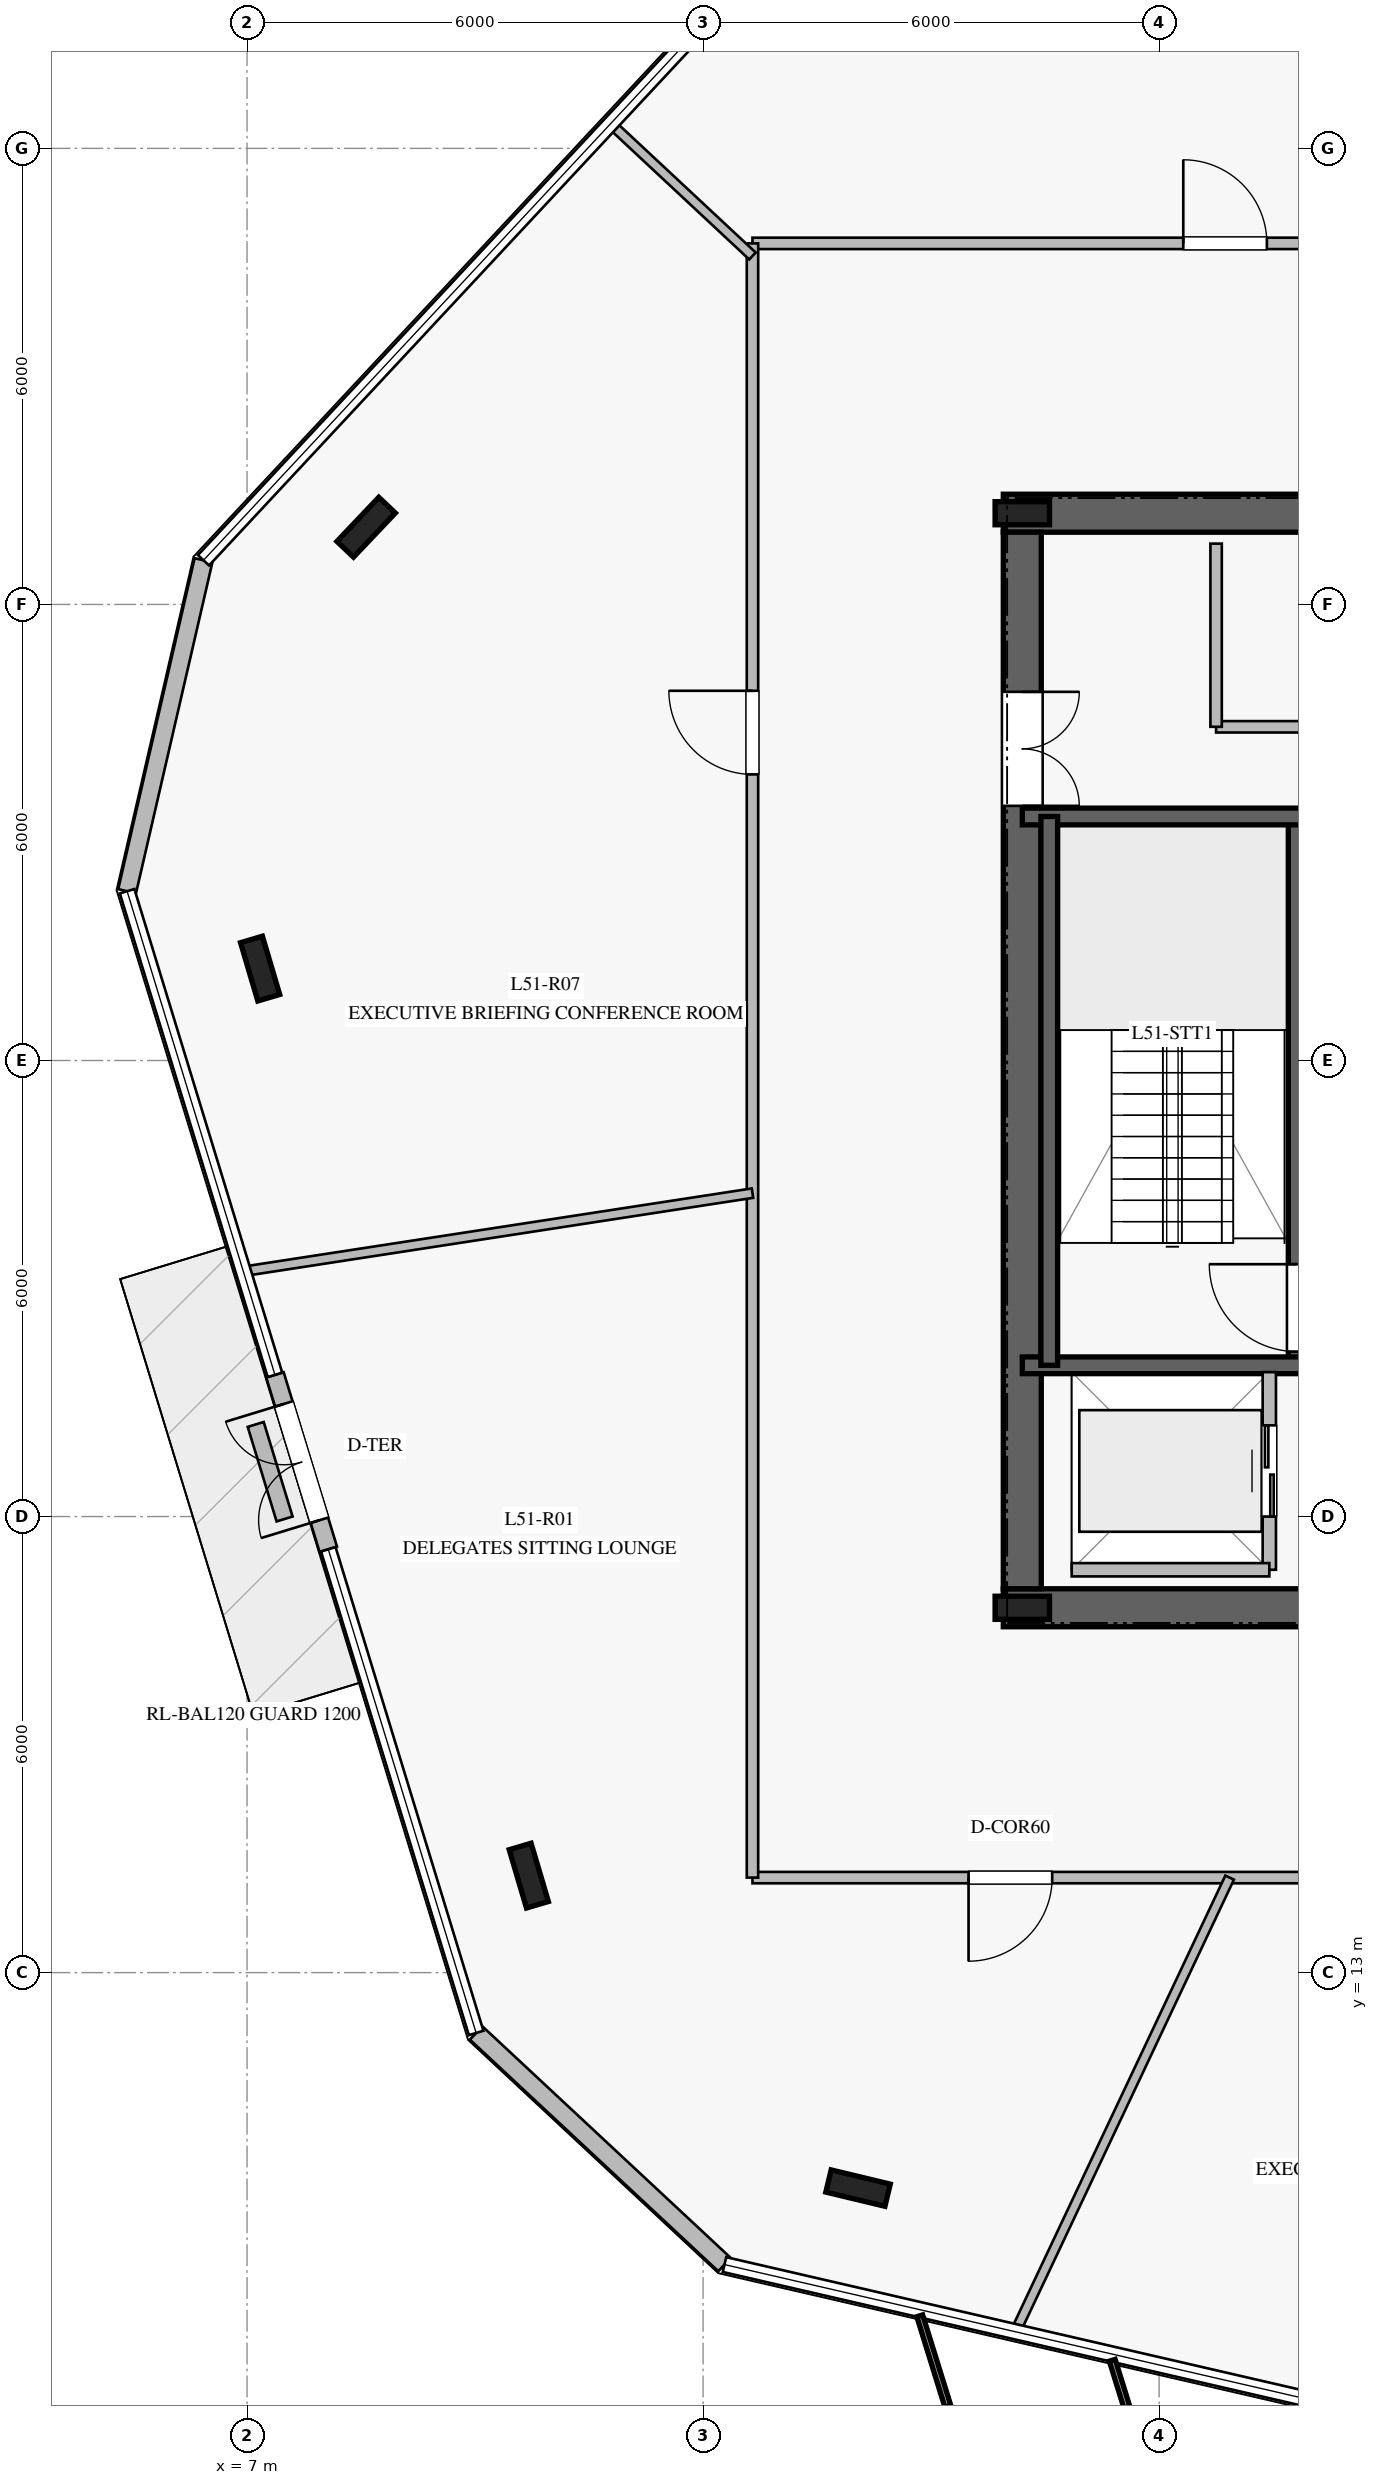
"""IFC4 building model, lengths in metres.
Left out: names, types, materials, properties, quantities, classifications, styles, units other than length and angle.
Written with IfcOpenShell. Run it as: python <this file> out.ifc"""

import sys

from ifc_helpers import new_model, si_unit, direction, frame, frame_2d, origin, origin_2d, place, context, subcontext, project, spatial, rectangle, i_section, extrude, element, fill, save


model = new_model("IFC4")
c1 = context("Model", 3, precision=1e-05, world=origin(), true_north=direction((0.0, 1.0)))
c2 = subcontext(c1, "Body", "Model", "MODEL_VIEW")
j1 = project(units=[si_unit("LENGTHUNIT", "METRE"), si_unit("PLANEANGLEUNIT", "RADIAN")], contexts=[c1])
p1 = place(None, origin())
s1 = spatial("IfcSite", under=j1, at=p1, CompositionType="ELEMENT")
p2 = place(p1, origin())
s2 = spatial("IfcBuilding", under=s1, at=p2, CompositionType="ELEMENT")
p3 = place(p2, frame((0.0, 0.0, 212.8)))
s3 = spatial("IfcBuildingStorey", under=s2, at=p3, CompositionType="ELEMENT", Elevation=212.8)
p4 = place(p3, frame((16.95, 17.8, 0.0), z_axis=(0.0, 0.0, 1.0), x_axis=(1.0, 0.0, 0.0)))
e1 = element("IfcWall", 1, at=p4, inside=s3, PredefinedType="SHEAR", context=c2, shape_type="SweptSolid", body=[
    extrude(rectangle(XDim=16.1, YDim=0.5, at=frame_2d((8.05, 0.0))), origin(), (0.0, 0.0, 1.0), 3.78),
])
p5 = place(p4, frame((5.0, 0.0, 0.0)))
e2 = element("IfcOpeningElement", 2, at=p5, cuts=e1, PredefinedType="OPENING", context=c2, shape_type="SweptSolid", body=[
    extrude(rectangle(XDim=1.2, YDim=2.25, at=frame_2d((0.6, 1.125))), frame((0.0, 0.26, 0.0), z_axis=(0.0, -1.0, 0.0), x_axis=(1.0, 0.0, 0.0)), (0.0, 0.0, 1.0), 0.52),
])
p6 = place(p4, frame((13.95, 0.0, 0.0)))
e3 = element("IfcOpeningElement", 3, at=p6, cuts=e1, PredefinedType="OPENING", context=c2, shape_type="SweptSolid", body=[
    extrude(rectangle(XDim=0.9, YDim=2.1, at=frame_2d((0.45, 1.05))), frame((0.0, 0.26, 0.0), z_axis=(0.0, -1.0, 0.0), x_axis=(1.0, 0.0, 0.0)), (0.0, 0.0, 1.0), 0.52),
])
p7 = place(p4, frame((9.2, 0.0, 0.0)))
e4 = element("IfcOpeningElement", 4, at=p7, cuts=e1, PredefinedType="OPENING", context=c2, shape_type="SweptSolid", body=[
    extrude(rectangle(XDim=1.1, YDim=2.2, at=frame_2d((0.55, 1.1))), frame((0.0, 0.26, 0.0), z_axis=(0.0, -1.0, 0.0), x_axis=(1.0, 0.0, 0.0)), (0.0, 0.0, 1.0), 0.52),
])
p8 = place(p3, frame((33.05, 32.2, 0.0), z_axis=(0.0, 0.0, 1.0), x_axis=(-1.0, 0.0, 0.0)))
e5 = element("IfcWall", 5, at=p8, inside=s3, PredefinedType="SHEAR", context=c2, shape_type="SweptSolid", body=[
    extrude(rectangle(XDim=16.1, YDim=0.5, at=frame_2d((8.05, 0.0))), origin(), (0.0, 0.0, 1.0), 3.78),
])
p9 = place(p8, frame((5.0, 0.0, 0.0)))
e6 = element("IfcOpeningElement", 6, at=p9, cuts=e5, PredefinedType="OPENING", context=c2, shape_type="SweptSolid", body=[
    extrude(rectangle(XDim=1.2, YDim=2.25, at=frame_2d((0.6, 1.125))), frame((0.0, 0.26, 0.0), z_axis=(0.0, -1.0, 0.0), x_axis=(1.0, 0.0, 0.0)), (0.0, 0.0, 1.0), 0.52),
])
p10 = place(p8, frame((9.825, 0.0, 0.0)))
e7 = element("IfcOpeningElement", 7, at=p10, cuts=e5, PredefinedType="OPENING", context=c2, shape_type="SweptSolid", body=[
    extrude(rectangle(XDim=1.1, YDim=2.2, at=frame_2d((0.55, 1.1))), frame((0.0, 0.26, 0.0), z_axis=(0.0, -1.0, 0.0), x_axis=(1.0, 0.0, 0.0)), (0.0, 0.0, 1.0), 0.52),
])
p11 = place(p3, frame((17.2, 31.95, 0.0), z_axis=(0.0, 0.0, 1.0), x_axis=(0.0, -1.0, 0.0)))
e8 = element("IfcWall", 8, at=p11, inside=s3, PredefinedType="SHEAR", context=c2, shape_type="SweptSolid", body=[
    extrude(rectangle(XDim=13.9, YDim=0.5, at=frame_2d((6.95, 0.0))), origin(), (0.0, 0.0, 1.0), 3.78),
])
p12 = place(p11, frame((2.1, 0.0, 0.0)))
e9 = element("IfcOpeningElement", 9, at=p12, cuts=e8, PredefinedType="OPENING", context=c2, shape_type="SweptSolid", body=[
    extrude(rectangle(XDim=1.5, YDim=2.2, at=frame_2d((0.75, 1.1))), frame((0.0, 0.26, 0.0), z_axis=(0.0, -1.0, 0.0), x_axis=(1.0, 0.0, 0.0)), (0.0, 0.0, 1.0), 0.52),
])
for number, where, z_axis, x_axis in (
    (10, (17.2, 17.8, 0.0), (0.0, 0.0, 1.0), (1.0, 0.0, 0.0)),
    (11, (17.2, 32.2, 0.0), (0.0, 0.0, 1.0), (1.0, 0.0, 0.0)),
):
    element("IfcColumn", number, at=place(p3, frame(where, z_axis=z_axis, x_axis=x_axis)), inside=s3, PredefinedType="COLUMN", context=c2, shape_type="SweptSolid", body=[
        extrude(i_section(OverallWidth=0.304, OverallDepth=0.716, WebThickness=0.021, FlangeThickness=0.04, at=origin_2d()), origin(), (0.0, 0.0, 1.0), 4.0),
    ])
p13 = place(p3, frame((20.81, 20.99, 0.0), z_axis=(0.0, 0.0, 1.0), x_axis=(0.0, 1.0, 0.0)))
e12 = element("IfcWall", 12, at=p13, inside=s3, PredefinedType="SOLIDWALL", context=c2, shape_type="SweptSolid", body=[
    extrude(rectangle(XDim=7.22, YDim=0.22, at=frame_2d((3.61, 0.0))), origin(), (0.0, 0.0, 1.0), 3.78),
])
p14 = place(p13, frame((0.18, 0.0, 0.0)))
e13 = element("IfcOpeningElement", 13, at=p14, cuts=e12, PredefinedType="OPENING", context=c2, shape_type="SweptSolid", body=[
    extrude(rectangle(XDim=1.15, YDim=2.2, at=frame_2d((0.575, 1.1))), frame((0.0, 0.12, 0.0), z_axis=(0.0, -1.0, 0.0), x_axis=(1.0, 0.0, 0.0)), (0.0, 0.0, 1.0), 0.24),
])
for number, where, z_axis, x_axis in (
    (14, (17.2, 20.99, 0.0), (0.0, 0.0, 1.0), (1.0, 0.0, 0.0)),
    (15, (17.2, 28.21, 0.0), (0.0, 0.0, 1.0), (1.0, 0.0, 0.0)),
):
    element("IfcWall", number, at=place(p3, frame(where, z_axis=z_axis, x_axis=x_axis)), inside=s3, PredefinedType="SOLIDWALL", context=c2, shape_type="SweptSolid", body=[
        extrude(rectangle(XDim=3.72, YDim=0.22, at=frame_2d((1.86, 0.0))), origin(), (0.0, 0.0, 1.0), 3.78),
    ])
p15 = place(p3, frame((17.555, 28.21, 0.0), z_axis=(0.0, 0.0, 1.0), x_axis=(0.0, -1.0, 0.0)))
e16 = element("IfcWall", 16, at=p15, inside=s3, PredefinedType="SOLIDWALL", context=c2, shape_type="SweptSolid", body=[
    extrude(rectangle(XDim=7.22, YDim=0.22, at=frame_2d((3.61, 0.0))), origin(), (0.0, 0.0, 1.0), 3.78),
])
for number, where, z_axis, x_axis in (
    (17, (8.567, 32.016, 0.0), (0.0, 0.0, 1.0), (0.688, 0.725, 0.0)),
    (18, (7.172, 26.209, 0.0), (0.0, 0.0, 1.0), (-0.284, 0.959, 0.0)),
    (19, (10.707, 14.276, 0.0), (0.0, 0.0, 1.0), (-0.284, 0.959, 0.0)),
    (20, (15.039, 10.165, 0.0), (0.0, 0.0, 1.0), (-0.972, 0.233, 0.0)),
):
    element("IfcColumn", number, at=place(p3, frame(where, z_axis=z_axis, x_axis=x_axis)), inside=s3, PredefinedType="COLUMN", context=c2, shape_type="SweptSolid", body=[
        extrude(i_section(OverallWidth=0.3, OverallDepth=0.8, WebThickness=0.018, FlangeThickness=0.033, at=origin_2d()), origin(), (0.0, 0.0, 1.0), 4.0),
    ])
p16 = place(p3, frame((6.427, 31.581, 0.0), z_axis=(0.0, 0.0, 1.0), x_axis=(-0.224883448427, -0.974385670371, 0.0)))
e21 = element("IfcWall", 21, at=p16, inside=s3, PredefinedType="STANDARD", context=c2, shape_type="SweptSolid", body=[
    extrude(rectangle(XDim=4.469, YDim=0.24, at=frame_2d((2.234, 0.0))), origin(), (0.0, 0.0, 1.0), 3.78),
])
p17 = place(p3, frame((7.367, 20.864, 0.0), z_axis=(0.0, 0.0, 1.0), x_axis=(0.292570005461, -0.95624410686, 0.0)))
e22 = element("IfcWall", 22, at=p17, inside=s3, PredefinedType="STANDARD", context=c2, shape_type="SweptSolid", body=[
    extrude(rectangle(XDim=2.4, YDim=0.24, at=frame_2d((1.2, 0.0))), origin(), (0.0, 0.0, 1.0), 3.78),
])
p18 = place(p17, frame((0.4, 0.0, 0.0)))
e23 = element("IfcOpeningElement", 23, at=p18, cuts=e22, PredefinedType="OPENING", context=c2, shape_type="SweptSolid", body=[
    extrude(rectangle(XDim=1.6, YDim=2.25, at=frame_2d((0.8, 1.125))), frame((0.0, 0.13, 0.0), z_axis=(0.0, -1.0, 0.0), x_axis=(1.0, 0.0, 0.0)), (0.0, 0.0, 1.0), 0.26),
])
p19 = place(p3, frame((10.014, 12.206, 0.0), z_axis=(0.0, 0.0, 1.0), x_axis=(0.73139858415, -0.681950226265, 0.0)))
e24 = element("IfcWall", 24, at=p19, inside=s3, PredefinedType="STANDARD", context=c2, shape_type="SweptSolid", body=[
    extrude(rectangle(XDim=4.468, YDim=0.24, at=frame_2d((2.234, 0.0))), origin(), (0.0, 0.0, 1.0), 3.78),
])
p20 = place(p3, frame((7.114, 20.212, 0.0), z_axis=(0.0, 0.0, 1.0), x_axis=(0.292080232212, -0.956393819486, 0.0)))
e25 = element("IfcWall", 25, at=p20, inside=s3, PredefinedType="USERDEFINED", context=c2, shape_type="SweptSolid", body=[
    extrude(rectangle(XDim=1.301, YDim=0.22, at=frame_2d((0.65, 0.0))), origin(), (0.0, 0.0, 1.0), 0.4),
])
p21 = place(p3, frame((19.75, 29.39, 0.0), z_axis=(0.0, 0.0, 1.0), x_axis=(1.0, 0.0, 0.0)))
e26 = element("IfcWall", 26, at=p21, inside=s3, PredefinedType="PARTITIONING", context=c2, shape_type="SweptSolid", body=[
    extrude(rectangle(XDim=5.9, YDim=0.15, at=frame_2d((2.95, 0.0))), origin(), (0.0, 0.0, 1.0), 3.78),
])
p22 = place(p3, frame((19.75, 29.39, 0.0), z_axis=(0.0, 0.0, 1.0), x_axis=(0.0, 1.0, 0.0)))
e27 = element("IfcWall", 27, at=p22, inside=s3, PredefinedType="PARTITIONING", context=c2, shape_type="SweptSolid", body=[
    extrude(rectangle(XDim=2.41, YDim=0.15, at=frame_2d((1.205, 0.0))), origin(), (0.0, 0.0, 1.0), 3.78),
])
p23 = place(p3, frame((20.45, 18.3, 0.0), z_axis=(0.0, 0.0, 1.0), x_axis=(0.0, 1.0, 0.0)))
e28 = element("IfcWall", 28, at=p23, inside=s3, PredefinedType="PARTITIONING", context=c2, shape_type="SweptSolid", body=[
    extrude(rectangle(XDim=2.6, YDim=0.175, at=frame_2d((1.3, 0.0))), origin(), (0.0, 0.0, 1.0), 3.78),
])
p24 = place(p23, frame((0.7, 0.0, 0.0)))
e29 = element("IfcOpeningElement", 29, at=p24, cuts=e28, PredefinedType="OPENING", context=c2, shape_type="SweptSolid", body=[
    extrude(rectangle(XDim=1.2, YDim=2.2, at=frame_2d((0.6, 1.1))), frame((0.0, 0.098, 0.0), z_axis=(0.0, -1.0, 0.0), x_axis=(1.0, 0.0, 0.0)), (0.0, 0.0, 1.0), 0.195),
])
p25 = place(p3, frame((17.85, 18.3, 0.0), z_axis=(0.0, 0.0, 1.0), x_axis=(1.0, 0.0, 0.0)))
e30 = element("IfcWall", 30, at=p25, inside=s3, PredefinedType="PARTITIONING", context=c2, shape_type="SweptSolid", body=[
    extrude(rectangle(XDim=2.6, YDim=0.175, at=frame_2d((1.3, 0.0))), origin(), (0.0, 0.0, 1.0), 3.78),
])
p26 = place(p3, frame((13.65, 35.75, 0.0), z_axis=(0.0, 0.0, 1.0), x_axis=(1.0, 0.0, 0.0)))
e31 = element("IfcWall", 31, at=p26, inside=s3, PredefinedType="PARTITIONING", context=c2, shape_type="SweptSolid", body=[
    extrude(rectangle(XDim=22.7, YDim=0.15, at=frame_2d((11.35, 0.0))), origin(), (0.0, 0.0, 1.0), 3.28),
])
p27 = place(p26, frame((16.829, 0.0, 0.0)))
e32 = element("IfcOpeningElement", 32, at=p27, cuts=e31, PredefinedType="OPENING", context=c2, shape_type="SweptSolid", body=[
    extrude(rectangle(XDim=1.1, YDim=2.2, at=frame_2d((0.55, 1.1))), frame((0.0, 0.085, 0.0), z_axis=(0.0, -1.0, 0.0), x_axis=(1.0, 0.0, 0.0)), (0.0, 0.0, 1.0), 0.17),
])
p28 = place(p26, frame((5.668, 0.0, 0.0)))
e33 = element("IfcOpeningElement", 33, at=p28, cuts=e31, PredefinedType="OPENING", context=c2, shape_type="SweptSolid", body=[
    extrude(rectangle(XDim=1.1, YDim=2.2, at=frame_2d((0.55, 1.1))), frame((0.0, 0.085, 0.0), z_axis=(0.0, -1.0, 0.0), x_axis=(1.0, 0.0, 0.0)), (0.0, 0.0, 1.0), 0.17),
])
p29 = place(p3, frame((36.35, 14.25, 0.0), z_axis=(0.0, 0.0, 1.0), x_axis=(-1.0, 0.0, 0.0)))
e34 = element("IfcWall", 34, at=p29, inside=s3, PredefinedType="PARTITIONING", context=c2, shape_type="SweptSolid", body=[
    extrude(rectangle(XDim=22.7, YDim=0.15, at=frame_2d((11.35, 0.0))), origin(), (0.0, 0.0, 1.0), 3.02),
])
p30 = place(p29, frame((18.757, 0.0, 0.0)))
e35 = element("IfcOpeningElement", 35, at=p30, cuts=e34, PredefinedType="OPENING", context=c2, shape_type="SweptSolid", body=[
    extrude(rectangle(XDim=1.1, YDim=2.2, at=frame_2d((0.55, 1.1))), frame((0.0, 0.085, 0.0), z_axis=(0.0, -1.0, 0.0), x_axis=(1.0, 0.0, 0.0)), (0.0, 0.0, 1.0), 0.17),
])
p31 = place(p29, frame((10.91, 0.0, 0.0)))
e36 = element("IfcOpeningElement", 36, at=p31, cuts=e34, PredefinedType="OPENING", context=c2, shape_type="SweptSolid", body=[
    extrude(rectangle(XDim=1.1, YDim=2.2, at=frame_2d((0.55, 1.1))), frame((0.0, 0.085, 0.0), z_axis=(0.0, -1.0, 0.0), x_axis=(1.0, 0.0, 0.0)), (0.0, 0.0, 1.0), 0.17),
])
p32 = place(p3, frame((13.65, 14.25, 0.0), z_axis=(0.0, 0.0, 1.0), x_axis=(0.0, 1.0, 0.0)))
e37 = element("IfcWall", 37, at=p32, inside=s3, PredefinedType="PARTITIONING", context=c2, shape_type="SweptSolid", body=[
    extrude(rectangle(XDim=21.5, YDim=0.15, at=frame_2d((10.75, 0.0))), origin(), (0.0, 0.0, 1.0), 3.05),
])
p33 = place(p32, frame((14.514, 0.0, 0.0)))
e38 = element("IfcOpeningElement", 38, at=p33, cuts=e37, PredefinedType="OPENING", context=c2, shape_type="SweptSolid", body=[
    extrude(rectangle(XDim=1.1, YDim=2.2, at=frame_2d((0.55, 1.1))), frame((0.0, 0.085, 0.0), z_axis=(0.0, -1.0, 0.0), x_axis=(1.0, 0.0, 0.0)), (0.0, 0.0, 1.0), 0.17),
])
p34 = place(p3, frame((13.65, 35.584, 0.0), z_axis=(0.0, 0.0, 1.0), x_axis=(-0.731138505923, 0.682229056225, 0.0)))
e39 = element("IfcWall", 39, at=p34, inside=s3, PredefinedType="PARTITIONING", context=c2, shape_type="SweptSolid", body=[
    extrude(rectangle(XDim=2.536, YDim=0.125, at=frame_2d((1.268, 0.0))), origin(), (0.0, 0.0, 1.0), 3.18),
])
p35 = place(p3, frame((13.65, 23.255, 0.0), z_axis=(0.0, 0.0, 1.0), x_axis=(-0.988396734226, -0.151894357271, 0.0)))
e40 = element("IfcWall", 40, at=p35, inside=s3, PredefinedType="PARTITIONING", context=c2, shape_type="SweptSolid", body=[
    extrude(rectangle(XDim=6.76, YDim=0.125, at=frame_2d((3.38, 0.0))), origin(), (0.0, 0.0, 1.0), 3.05),
])
p36 = place(p3, frame((19.928, 14.25, 0.0), z_axis=(0.0, 0.0, 1.0), x_axis=(-0.426706727615, -0.904390053355, 0.0)))
e41 = element("IfcWall", 41, at=p36, inside=s3, PredefinedType="PARTITIONING", context=c2, shape_type="SweptSolid", body=[
    extrude(rectangle(XDim=6.59, YDim=0.125, at=frame_2d((3.295, 0.0))), origin(), (0.0, 0.0, 1.0), 3.18),
])
p37 = place(p18, frame((1.6, 0.0, 0.0), z_axis=(0.0, 0.0, 1.0), x_axis=(-1.0, 0.0, 0.0)))
e42 = element("IfcDoor", 42, at=p37, inside=s3, OperationType="DOUBLE_DOOR_SINGLE_SWING", PredefinedType="DOOR", context=c2, shape_type="SweptSolid", body=[
    extrude(rectangle(XDim=1.6, YDim=2.25, at=frame_2d((0.8, 1.125))), frame((0.0, 0.025, 0.0), z_axis=(0.0, -1.0, 0.0), x_axis=(1.0, 0.0, 0.0)), (0.0, 0.0, 1.0), 0.05),
])
fill(e23, e42)
p38 = place(p14, origin())
e43 = element("IfcDoor", 43, at=p38, inside=s3, OperationType="SINGLE_SWING_RIGHT", PredefinedType="DOOR", context=c2, shape_type="SweptSolid", body=[
    extrude(rectangle(XDim=1.15, YDim=2.2, at=frame_2d((0.575, 1.1))), frame((0.0, 0.025, 0.0), z_axis=(0.0, -1.0, 0.0), x_axis=(1.0, 0.0, 0.0)), (0.0, 0.0, 1.0), 0.05),
])
fill(e13, e43)
p39 = place(p12, origin())
e44 = element("IfcDoor", 44, at=p39, inside=s3, OperationType="DOUBLE_DOOR_SINGLE_SWING", PredefinedType="DOOR", context=c2, shape_type="SweptSolid", body=[
    extrude(rectangle(XDim=1.5, YDim=2.2, at=frame_2d((0.75, 1.1))), frame((0.0, 0.025, 0.0), z_axis=(0.0, -1.0, 0.0), x_axis=(1.0, 0.0, 0.0)), (0.0, 0.0, 1.0), 0.05),
])
fill(e9, e44)
p40 = place(p24, origin())
e45 = element("IfcDoor", 45, at=p40, inside=s3, OperationType="DOUBLE_DOOR_SLIDING", PredefinedType="DOOR", context=c2, shape_type="SweptSolid", body=[
    extrude(rectangle(XDim=1.2, YDim=2.2, at=frame_2d((0.6, 1.1))), frame((0.0, 0.025, 0.0), z_axis=(0.0, -1.0, 0.0), x_axis=(1.0, 0.0, 0.0)), (0.0, 0.0, 1.0), 0.05),
])
fill(e29, e45)
p41 = place(p30, origin())
e46 = element("IfcDoor", 46, at=p41, inside=s3, OperationType="SINGLE_SWING_RIGHT", PredefinedType="DOOR", context=c2, shape_type="SweptSolid", body=[
    extrude(rectangle(XDim=1.1, YDim=2.2, at=frame_2d((0.55, 1.1))), frame((0.0, 0.025, 0.0), z_axis=(0.0, -1.0, 0.0), x_axis=(1.0, 0.0, 0.0)), (0.0, 0.0, 1.0), 0.05),
])
fill(e35, e46)
p42 = place(p28, origin())
e47 = element("IfcDoor", 47, at=p42, inside=s3, OperationType="SINGLE_SWING_LEFT", PredefinedType="DOOR", context=c2, shape_type="SweptSolid", body=[
    extrude(rectangle(XDim=1.1, YDim=2.2, at=frame_2d((0.55, 1.1))), frame((0.0, 0.025, 0.0), z_axis=(0.0, -1.0, 0.0), x_axis=(1.0, 0.0, 0.0)), (0.0, 0.0, 1.0), 0.05),
])
fill(e33, e47)
p43 = place(p33, origin())
e48 = element("IfcDoor", 48, at=p43, inside=s3, OperationType="SINGLE_SWING_RIGHT", PredefinedType="DOOR", context=c2, shape_type="SweptSolid", body=[
    extrude(rectangle(XDim=1.1, YDim=2.2, at=frame_2d((0.55, 1.1))), frame((0.0, 0.025, 0.0), z_axis=(0.0, -1.0, 0.0), x_axis=(1.0, 0.0, 0.0)), (0.0, 0.0, 1.0), 0.05),
])
fill(e38, e48)
save(model, sys.argv[1])
